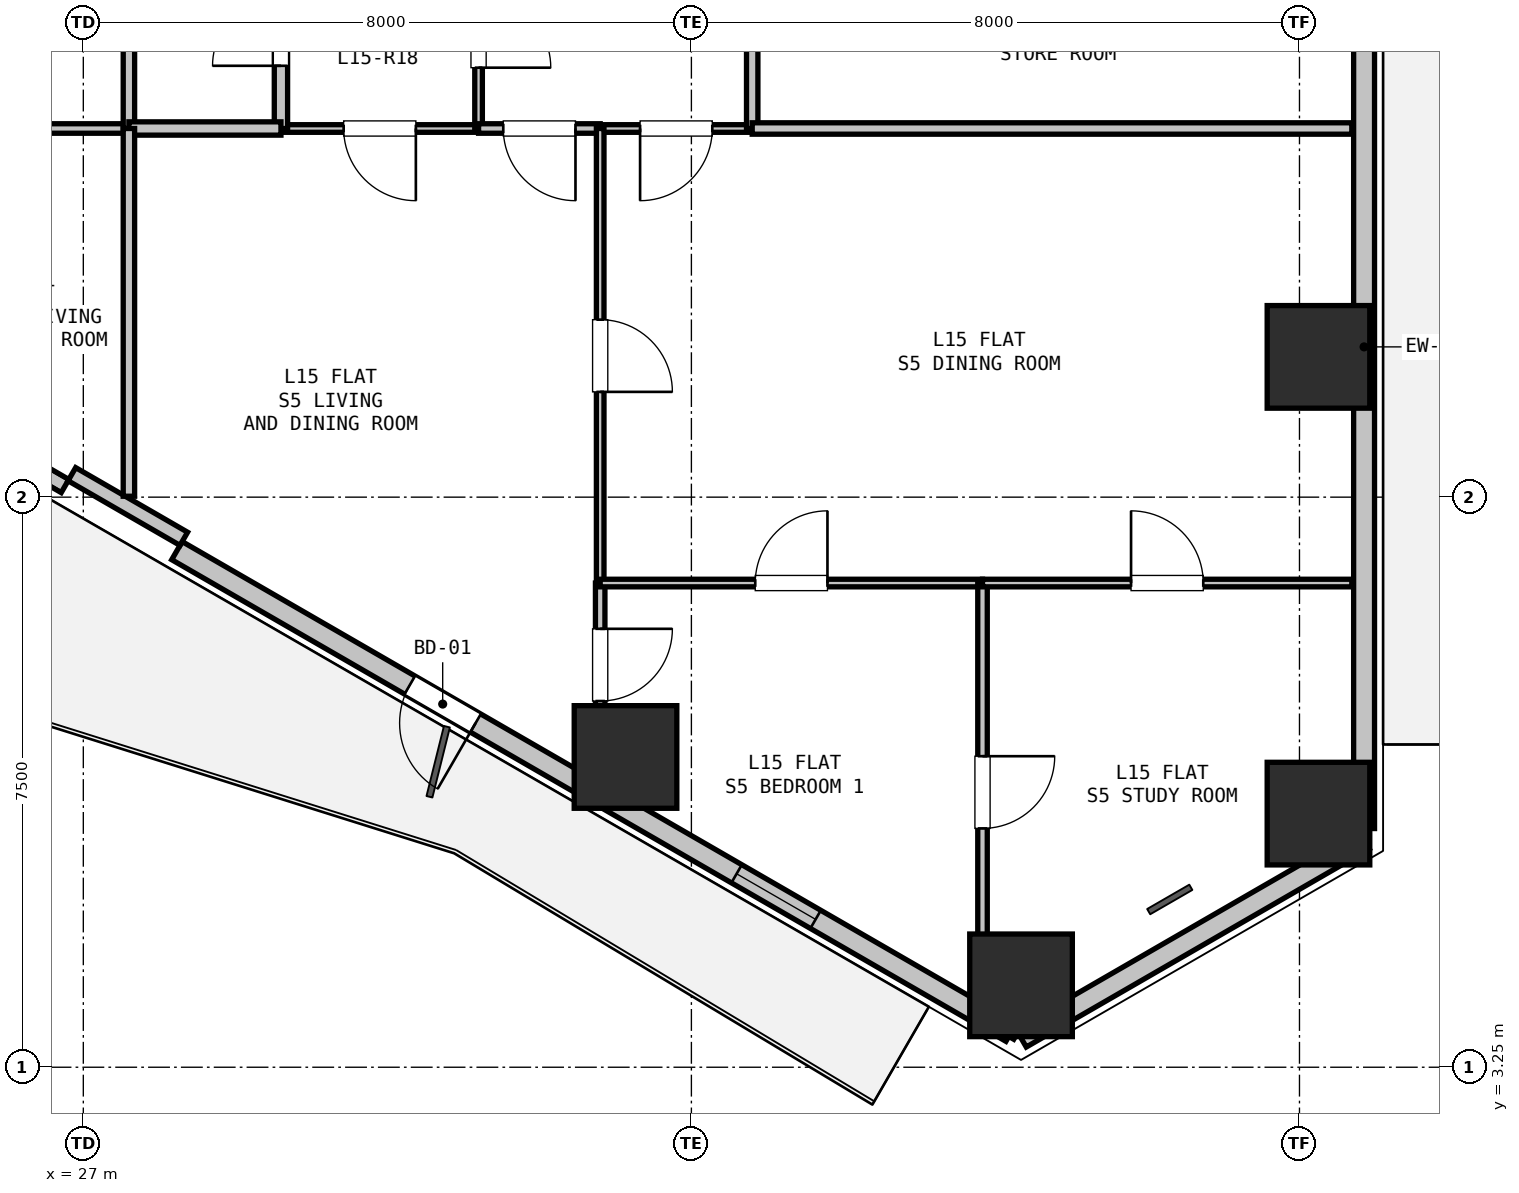
"""IFC4 building model, lengths in metres.
Left out: names, types, materials, properties, quantities, classifications, styles, units other than length and angle.
Written with IfcOpenShell. Run it as: python <this file> out.ifc"""

import sys

from ifc_helpers import new_model, si_unit, direction, frame, frame_2d, origin, origin_2d, place, context, subcontext, project, spatial, rectangle, hollow_rectangle, extrude, element, fill, save


model = new_model("IFC4")
c1 = context("Model", 3, precision=1e-05, world=origin(), true_north=direction((0.0, 1.0)))
c2 = subcontext(c1, "Body", "Model", "MODEL_VIEW")
j1 = project(units=[si_unit("LENGTHUNIT", "METRE"), si_unit("PLANEANGLEUNIT", "RADIAN")], contexts=[c1])
p1 = place(None, origin())
s1 = spatial("IfcSite", under=j1, at=p1, CompositionType="ELEMENT")
p2 = place(p1, origin())
s2 = spatial("IfcBuilding", under=s1, at=p2, CompositionType="ELEMENT")
p3 = place(p2, frame((0.0, 0.0, 55.5)))
s3 = spatial("IfcBuildingStorey", under=s2, at=p3, CompositionType="ELEMENT", Elevation=55.5)
for number, where, z_axis, x_axis in (
    (1, (43.25, 12.595, 0.0), (0.0, 0.0, 1.0), (1.0, 0.0, 0.0)),
    (2, (43.25, 6.587, 0.0), (0.0, 0.0, 1.0), (1.0, 0.0, 0.0)),
    (3, (39.337, 4.327, 0.0), (0.0, 0.0, 1.0), (1.0, 0.0, 0.0)),
    (4, (34.133, 7.332, 0.0), (0.0, 0.0, 1.0), (1.0, 0.0, 0.0)),
):
    element("IfcColumn", number, at=place(p3, frame(where, z_axis=z_axis, x_axis=x_axis)), inside=s3, PredefinedType="COLUMN", context=c2, shape_type="SweptSolid", body=[
        extrude(hollow_rectangle(XDim=1.35, YDim=1.35, WallThickness=0.036, at=origin_2d()), origin(), (0.0, 0.0, 1.0), 3.3),
    ])
p4 = place(p3, frame((43.85, 6.24, 0.0), z_axis=(0.0, 0.0, 1.0), x_axis=(-0.866043601342, -0.499968479581, 0.0)))
e5 = element("IfcWall", 5, at=p4, inside=s3, PredefinedType="SOLIDWALL", context=c2, shape_type="SweptSolid", body=[
    extrude(rectangle(XDim=5.211, YDim=0.275, at=frame_2d((2.605, 0.0))), origin(), (0.0, 0.0, 1.0), 2.66),
])
p5 = place(p3, frame((43.85, 19.063, 0.0), z_axis=(0.0, 0.0, 1.0), x_axis=(0.0, -1.0, 0.0)))
e6 = element("IfcWall", 6, at=p5, inside=s3, PredefinedType="SOLIDWALL", context=c2, shape_type="SweptSolid", body=[
    extrude(rectangle(XDim=12.673, YDim=0.275, at=frame_2d((6.336, 0.0))), origin(), (0.0, 0.0, 1.0), 2.66),
])
p6 = place(p3, frame((39.207, 3.71, 0.0), z_axis=(0.0, 0.0, 1.0), x_axis=(-0.86603192154, 0.499988710747, 0.0)))
e7 = element("IfcWall", 7, at=p6, inside=s3, PredefinedType="SOLIDWALL", context=c2, shape_type="SweptSolid", body=[
    extrude(rectangle(XDim=12.673, YDim=0.275, at=frame_2d((6.336, 0.0))), origin(), (0.0, 0.0, 1.0), 2.66),
])
p7 = place(p6, frame((8.136, 0.0, 0.0)))
e8 = element("IfcOpeningElement", 8, at=p7, cuts=e7, PredefinedType="OPENING", context=c2, shape_type="SweptSolid", body=[
    extrude(rectangle(XDim=1.0, YDim=2.1, at=frame_2d((0.5, 1.05))), frame((0.0, 0.147, 0.0), z_axis=(0.0, -1.0, 0.0), x_axis=(1.0, 0.0, 0.0)), (0.0, 0.0, 1.0), 0.295),
])
p8 = place(p6, frame((2.971, 0.0, 0.9)))
e9 = element("IfcOpeningElement", 9, at=p8, cuts=e7, PredefinedType="OPENING", context=c2, shape_type="SweptSolid", body=[
    extrude(rectangle(XDim=1.2, YDim=1.4, at=frame_2d((0.6, 0.7))), frame((0.0, 0.147, 0.0), z_axis=(0.0, -1.0, 0.0), x_axis=(1.0, 0.0, 0.0)), (0.0, 0.0, 1.0), 0.295),
])
p9 = place(p3, frame((26.76, 10.896, 0.0), z_axis=(0.0, 0.0, 1.0), x_axis=(-0.866027351828, 0.499996625875, 0.0)))
e10 = element("IfcWall", 10, at=p9, inside=s3, PredefinedType="PARAPET", context=c2, shape_type="SweptSolid", body=[
    extrude(rectangle(XDim=11.973, YDim=0.2, at=frame_2d((5.987, 0.0))), origin(), (0.0, 0.0, 1.0), 0.2),
])
p10 = place(p3, frame((28.322, 10.202, 0.0), z_axis=(0.0, 0.0, 1.0), x_axis=(-0.86605165483, 0.499954529098, 0.0)))
e11 = element("IfcWall", 11, at=p10, inside=s3, PredefinedType="PARAPET", context=c2, shape_type="SweptSolid", body=[
    extrude(rectangle(XDim=1.7, YDim=0.2, at=frame_2d((0.85, 0.0))), origin(), (0.0, 0.0, 1.0), 2.66),
])
p11 = place(p3, frame((32.2, 15.6, 0.0), z_axis=(0.0, 0.0, 1.0), x_axis=(-1.0, 0.0, 0.0)))
e12 = element("IfcWall", 12, at=p11, inside=s3, PredefinedType="PARTITIONING", context=c2, shape_type="SweptSolid", body=[
    extrude(rectangle(XDim=2.6, YDim=0.1, at=frame_2d((1.3, 0.0))), origin(), (0.0, 0.0, 1.0), 3.04),
])
p12 = place(p11, frame((0.825, 0.0, 0.0)))
e13 = element("IfcOpeningElement", 13, at=p12, cuts=e12, PredefinedType="OPENING", context=c2, shape_type="SweptSolid", body=[
    extrude(rectangle(XDim=0.95, YDim=2.1, at=frame_2d((0.475, 1.05))), frame((0.0, 0.06, 0.0), z_axis=(0.0, -1.0, 0.0), x_axis=(1.0, 0.0, 0.0)), (0.0, 0.0, 1.0), 0.12),
])
p13 = place(p3, frame((29.6, 15.6, 0.0), z_axis=(0.0, 0.0, 1.0), x_axis=(0.0, 1.0, 0.0)))
e14 = element("IfcWall", 14, at=p13, inside=s3, PredefinedType="PLUMBINGWALL", context=c2, shape_type="SweptSolid", body=[
    extrude(rectangle(XDim=2.55, YDim=0.175, at=frame_2d((1.275, 0.0))), origin(), (0.0, 0.0, 1.0), 3.04),
])
p14 = place(p13, frame((0.825, 0.0, 0.0)))
e15 = element("IfcOpeningElement", 15, at=p14, cuts=e14, PredefinedType="OPENING", context=c2, shape_type="SweptSolid", body=[
    extrude(rectangle(XDim=0.9, YDim=2.1, at=frame_2d((0.45, 1.05))), frame((0.0, 0.097, 0.0), z_axis=(0.0, -1.0, 0.0), x_axis=(1.0, 0.0, 0.0)), (0.0, 0.0, 1.0), 0.195),
])
p15 = place(p3, frame((32.2, 18.15, 0.0), z_axis=(0.0, 0.0, 1.0), x_axis=(0.0, -1.0, 0.0)))
e16 = element("IfcWall", 16, at=p15, inside=s3, PredefinedType="PARTITIONING", context=c2, shape_type="SweptSolid", body=[
    extrude(rectangle(XDim=2.55, YDim=0.1, at=frame_2d((1.275, 0.0))), origin(), (0.0, 0.0, 1.0), 3.04),
])
p16 = place(p15, frame((0.8, 0.0, 0.0)))
e17 = element("IfcOpeningElement", 17, at=p16, cuts=e16, PredefinedType="OPENING", context=c2, shape_type="SweptSolid", body=[
    extrude(rectangle(XDim=0.95, YDim=2.1, at=frame_2d((0.475, 1.05))), frame((0.0, 0.06, 0.0), z_axis=(0.0, -1.0, 0.0), x_axis=(1.0, 0.0, 0.0)), (0.0, 0.0, 1.0), 0.12),
])
p17 = place(p3, frame((27.6, 15.6, 0.0), z_axis=(0.0, 0.0, 1.0), x_axis=(-1.0, 0.0, 0.0)))
e18 = element("IfcWall", 18, at=p17, inside=s3, PredefinedType="PARTITIONING", context=c2, shape_type="SweptSolid", body=[
    extrude(rectangle(XDim=3.2, YDim=0.125, at=frame_2d((1.6, 0.0))), origin(), (0.0, 0.0, 1.0), 2.337),
])
p18 = place(p17, frame((1.125, 0.0, 0.0)))
e19 = element("IfcOpeningElement", 19, at=p18, cuts=e18, PredefinedType="OPENING", context=c2, shape_type="SweptSolid", body=[
    extrude(rectangle(XDim=0.95, YDim=2.1, at=frame_2d((0.475, 1.05))), frame((0.0, 0.073, 0.0), z_axis=(0.0, -1.0, 0.0), x_axis=(1.0, 0.0, 0.0)), (0.0, 0.0, 1.0), 0.145),
])
p19 = place(p3, frame((27.6, 18.15, 0.0), z_axis=(0.0, 0.0, 1.0), x_axis=(0.0, -1.0, 0.0)))
e20 = element("IfcWall", 20, at=p19, inside=s3, PredefinedType="PARTITIONING", context=c2, shape_type="SweptSolid", body=[
    extrude(rectangle(XDim=2.55, YDim=0.15, at=frame_2d((1.275, 0.0))), origin(), (0.0, 0.0, 1.0), 3.04),
])
p20 = place(p3, frame((29.6, 15.6, 0.0), z_axis=(0.0, 0.0, 1.0), x_axis=(-1.0, 0.0, 0.0)))
e21 = element("IfcWall", 21, at=p20, inside=s3, PredefinedType="PLUMBINGWALL", context=c2, shape_type="SweptSolid", body=[
    extrude(rectangle(XDim=2.0, YDim=0.175, at=frame_2d((1.0, 0.0))), origin(), (0.0, 0.0, 1.0), 3.04),
])
p21 = place(p3, frame((35.8, 15.6, 0.0), z_axis=(0.0, 0.0, 1.0), x_axis=(-1.0, 0.0, 0.0)))
e22 = element("IfcWall", 22, at=p21, inside=s3, PredefinedType="PARTITIONING", context=c2, shape_type="SweptSolid", body=[
    extrude(rectangle(XDim=2.0, YDim=0.1, at=frame_2d((1.0, 0.0))), origin(), (0.0, 0.0, 1.0), 3.04),
])
p22 = place(p21, frame((0.525, 0.0, 0.0)))
e23 = element("IfcOpeningElement", 23, at=p22, cuts=e22, PredefinedType="OPENING", context=c2, shape_type="SweptSolid", body=[
    extrude(rectangle(XDim=0.95, YDim=2.1, at=frame_2d((0.475, 1.05))), frame((0.0, 0.06, 0.0), z_axis=(0.0, -1.0, 0.0), x_axis=(1.0, 0.0, 0.0)), (0.0, 0.0, 1.0), 0.12),
])
p23 = place(p3, frame((33.8, 15.6, 0.0), z_axis=(0.0, 0.0, 1.0), x_axis=(-1.0, 0.0, 0.0)))
e24 = element("IfcWall", 24, at=p23, inside=s3, PredefinedType="PARTITIONING", context=c2, shape_type="SweptSolid", body=[
    extrude(rectangle(XDim=1.6, YDim=0.125, at=frame_2d((0.8, 0.0))), origin(), (0.0, 0.0, 1.0), 3.04),
])
p24 = place(p23, frame((0.325, 0.0, 0.0)))
e25 = element("IfcOpeningElement", 25, at=p24, cuts=e24, PredefinedType="OPENING", context=c2, shape_type="SweptSolid", body=[
    extrude(rectangle(XDim=0.95, YDim=2.1, at=frame_2d((0.475, 1.05))), frame((0.0, 0.073, 0.0), z_axis=(0.0, -1.0, 0.0), x_axis=(1.0, 0.0, 0.0)), (0.0, 0.0, 1.0), 0.145),
])
p25 = place(p3, frame((35.8, 18.15, 0.0), z_axis=(0.0, 0.0, 1.0), x_axis=(0.0, -1.0, 0.0)))
e26 = element("IfcWall", 26, at=p25, inside=s3, PredefinedType="PARTITIONING", context=c2, shape_type="SweptSolid", body=[
    extrude(rectangle(XDim=2.55, YDim=0.15, at=frame_2d((1.275, 0.0))), origin(), (0.0, 0.0, 1.0), 3.04),
])
p26 = place(p3, frame((43.688, 15.6, 0.0), z_axis=(0.0, 0.0, 1.0), x_axis=(-1.0, 0.0, 0.0)))
e27 = element("IfcWall", 27, at=p26, inside=s3, PredefinedType="PARTITIONING", context=c2, shape_type="SweptSolid", body=[
    extrude(rectangle(XDim=7.888, YDim=0.15, at=frame_2d((3.944, 0.0))), origin(), (0.0, 0.0, 1.0), 2.337),
])
p27 = place(p3, frame((27.6, 15.6, 0.0), z_axis=(0.0, 0.0, 1.0), x_axis=(0.0, -1.0, 0.0)))
e28 = element("IfcWall", 28, at=p27, inside=s3, PredefinedType="PARTITIONING", context=c2, shape_type="SweptSolid", body=[
    extrude(rectangle(XDim=4.838, YDim=0.15, at=frame_2d((2.419, 0.0))), origin(), (0.0, 0.0, 1.0), 2.337),
])
p28 = place(p3, frame((33.8, 15.6, 0.0), z_axis=(0.0, 0.0, 1.0), x_axis=(0.0, -1.0, 0.0)))
e29 = element("IfcWall", 29, at=p28, inside=s3, PredefinedType="PARTITIONING", context=c2, shape_type="SweptSolid", body=[
    extrude(rectangle(XDim=5.98, YDim=0.1, at=frame_2d((2.99, 0.0))), origin(), (0.0, 0.0, 1.0), 3.04),
])
p29 = place(p28, frame((2.515, 0.0, 0.0)))
e30 = element("IfcOpeningElement", 30, at=p29, cuts=e29, PredefinedType="OPENING", context=c2, shape_type="SweptSolid", body=[
    extrude(rectangle(XDim=0.95, YDim=2.1, at=frame_2d((0.475, 1.05))), frame((0.0, 0.06, 0.0), z_axis=(0.0, -1.0, 0.0), x_axis=(1.0, 0.0, 0.0)), (0.0, 0.0, 1.0), 0.12),
])
p30 = place(p3, frame((33.8, 9.62, 0.0), z_axis=(0.0, 0.0, 1.0), x_axis=(0.0, -1.0, 0.0)))
e31 = element("IfcWall", 31, at=p30, inside=s3, PredefinedType="PARTITIONING", context=c2, shape_type="SweptSolid", body=[
    extrude(rectangle(XDim=2.602, YDim=0.125, at=frame_2d((1.301, 0.0))), origin(), (0.0, 0.0, 1.0), 2.337),
])
p31 = place(p30, frame((0.602, 0.0, 0.0)))
e32 = element("IfcOpeningElement", 32, at=p31, cuts=e31, PredefinedType="OPENING", context=c2, shape_type="SweptSolid", body=[
    extrude(rectangle(XDim=0.95, YDim=2.1, at=frame_2d((0.475, 1.05))), frame((0.0, 0.073, 0.0), z_axis=(0.0, -1.0, 0.0), x_axis=(1.0, 0.0, 0.0)), (0.0, 0.0, 1.0), 0.145),
])
p32 = place(p3, frame((33.8, 9.62, 0.0), z_axis=(0.0, 0.0, 1.0), x_axis=(1.0, 0.0, 0.0)))
e33 = element("IfcWall", 33, at=p32, inside=s3, PredefinedType="PARTITIONING", context=c2, shape_type="SweptSolid", body=[
    extrude(rectangle(XDim=5.03, YDim=0.1, at=frame_2d((2.515, 0.0))), origin(), (0.0, 0.0, 1.0), 3.04),
])
p33 = place(p32, frame((2.04, 0.0, 0.0)))
e34 = element("IfcOpeningElement", 34, at=p33, cuts=e33, PredefinedType="OPENING", context=c2, shape_type="SweptSolid", body=[
    extrude(rectangle(XDim=0.95, YDim=2.1, at=frame_2d((0.475, 1.05))), frame((0.0, 0.06, 0.0), z_axis=(0.0, -1.0, 0.0), x_axis=(1.0, 0.0, 0.0)), (0.0, 0.0, 1.0), 0.12),
])
p34 = place(p3, frame((38.83, 9.62, 0.0), z_axis=(0.0, 0.0, 1.0), x_axis=(0.0, -1.0, 0.0)))
e35 = element("IfcWall", 35, at=p34, inside=s3, PredefinedType="PARTITIONING", context=c2, shape_type="SweptSolid", body=[
    extrude(rectangle(XDim=5.506, YDim=0.125, at=frame_2d((2.753, 0.0))), origin(), (0.0, 0.0, 1.0), 2.65),
])
p35 = place(p34, frame((2.278, 0.0, 0.0)))
e36 = element("IfcOpeningElement", 36, at=p35, cuts=e35, PredefinedType="OPENING", context=c2, shape_type="SweptSolid", body=[
    extrude(rectangle(XDim=0.95, YDim=2.1, at=frame_2d((0.475, 1.05))), frame((0.0, 0.073, 0.0), z_axis=(0.0, -1.0, 0.0), x_axis=(1.0, 0.0, 0.0)), (0.0, 0.0, 1.0), 0.145),
])
p36 = place(p3, frame((38.83, 9.62, 0.0), z_axis=(0.0, 0.0, 1.0), x_axis=(1.0, 0.0, 0.0)))
e37 = element("IfcWall", 37, at=p36, inside=s3, PredefinedType="PARTITIONING", context=c2, shape_type="SweptSolid", body=[
    extrude(rectangle(XDim=4.858, YDim=0.1, at=frame_2d((2.429, 0.0))), origin(), (0.0, 0.0, 1.0), 2.337),
])
p37 = place(p36, frame((1.954, 0.0, 0.0)))
e38 = element("IfcOpeningElement", 38, at=p37, cuts=e37, PredefinedType="OPENING", context=c2, shape_type="SweptSolid", body=[
    extrude(rectangle(XDim=0.95, YDim=2.1, at=frame_2d((0.475, 1.05))), frame((0.0, 0.06, 0.0), z_axis=(0.0, -1.0, 0.0), x_axis=(1.0, 0.0, 0.0)), (0.0, 0.0, 1.0), 0.12),
])
p38 = place(p3, frame((39.272, 3.672, 0.0), z_axis=(0.0, 0.0, 1.0), x_axis=(-0.866442544969, 0.49927679324, 0.0)))
e39 = element("IfcWall", 39, at=p38, inside=s3, PredefinedType="PARTITIONING", context=c2, shape_type="SweptSolid", body=[
    extrude(rectangle(XDim=0.142, YDim=0.125, at=frame_2d((0.071, 0.0))), origin(), (0.0, 0.0, 1.0), 3.04),
])
p39 = place(p7, origin())
e40 = element("IfcDoor", 40, at=p39, inside=s3, OperationType="SINGLE_SWING_LEFT", PredefinedType="DOOR", context=c2, shape_type="SweptSolid", body=[
    extrude(rectangle(XDim=1.0, YDim=2.1, at=frame_2d((0.5, 1.05))), frame((0.0, 0.025, 0.0), z_axis=(0.0, -1.0, 0.0), x_axis=(1.0, 0.0, 0.0)), (0.0, 0.0, 1.0), 0.05),
])
fill(e8, e40)
p40 = place(p8, origin())
e41 = element("IfcWindow", 41, at=p40, inside=s3, PartitioningType="SINGLE_PANEL", PredefinedType="WINDOW", context=c2, shape_type="SweptSolid", body=[
    extrude(rectangle(XDim=1.2, YDim=1.4, at=frame_2d((0.6, 0.7))), frame((0.0, 0.03, 0.0), z_axis=(0.0, -1.0, 0.0), x_axis=(1.0, 0.0, 0.0)), (0.0, 0.0, 1.0), 0.06),
])
fill(e9, e41)
p41 = place(p14, origin())
e42 = element("IfcDoor", 42, at=p41, inside=s3, OperationType="SINGLE_SWING_LEFT", PredefinedType="DOOR", context=c2, shape_type="SweptSolid", body=[
    extrude(rectangle(XDim=0.9, YDim=2.1, at=frame_2d((0.45, 1.05))), frame((0.0, 0.025, 0.0), z_axis=(0.0, -1.0, 0.0), x_axis=(1.0, 0.0, 0.0)), (0.0, 0.0, 1.0), 0.05),
])
fill(e15, e42)
p42 = place(p16, origin())
e43 = element("IfcDoor", 43, at=p42, inside=s3, OperationType="SINGLE_SWING_RIGHT", PredefinedType="DOOR", context=c2, shape_type="SweptSolid", body=[
    extrude(rectangle(XDim=0.95, YDim=2.1, at=frame_2d((0.475, 1.05))), frame((0.0, 0.025, 0.0), z_axis=(0.0, -1.0, 0.0), x_axis=(1.0, 0.0, 0.0)), (0.0, 0.0, 1.0), 0.05),
])
fill(e17, e43)
p43 = place(p12, origin())
e44 = element("IfcDoor", 44, at=p43, inside=s3, OperationType="SINGLE_SWING_LEFT", PredefinedType="DOOR", context=c2, shape_type="SweptSolid", body=[
    extrude(rectangle(XDim=0.95, YDim=2.1, at=frame_2d((0.475, 1.05))), frame((0.0, 0.025, 0.0), z_axis=(0.0, -1.0, 0.0), x_axis=(1.0, 0.0, 0.0)), (0.0, 0.0, 1.0), 0.05),
])
fill(e13, e44)
p44 = place(p24, origin())
e45 = element("IfcDoor", 45, at=p44, inside=s3, OperationType="SINGLE_SWING_LEFT", PredefinedType="DOOR", context=c2, shape_type="SweptSolid", body=[
    extrude(rectangle(XDim=0.95, YDim=2.1, at=frame_2d((0.475, 1.05))), frame((0.0, 0.025, 0.0), z_axis=(0.0, -1.0, 0.0), x_axis=(1.0, 0.0, 0.0)), (0.0, 0.0, 1.0), 0.05),
])
fill(e25, e45)
p45 = place(p22, origin())
e46 = element("IfcDoor", 46, at=p45, inside=s3, OperationType="SINGLE_SWING_RIGHT", PredefinedType="DOOR", context=c2, shape_type="SweptSolid", body=[
    extrude(rectangle(XDim=0.95, YDim=2.1, at=frame_2d((0.475, 1.05))), frame((0.0, 0.025, 0.0), z_axis=(0.0, -1.0, 0.0), x_axis=(1.0, 0.0, 0.0)), (0.0, 0.0, 1.0), 0.05),
])
fill(e23, e46)
p46 = place(p31, origin())
e47 = element("IfcDoor", 47, at=p46, inside=s3, OperationType="SINGLE_SWING_LEFT", PredefinedType="DOOR", context=c2, shape_type="SweptSolid", body=[
    extrude(rectangle(XDim=0.95, YDim=2.1, at=frame_2d((0.475, 1.05))), frame((0.0, 0.025, 0.0), z_axis=(0.0, -1.0, 0.0), x_axis=(1.0, 0.0, 0.0)), (0.0, 0.0, 1.0), 0.05),
])
fill(e32, e47)
p47 = place(p29, origin())
e48 = element("IfcDoor", 48, at=p47, inside=s3, OperationType="SINGLE_SWING_RIGHT", PredefinedType="DOOR", context=c2, shape_type="SweptSolid", body=[
    extrude(rectangle(XDim=0.95, YDim=2.1, at=frame_2d((0.475, 1.05))), frame((0.0, 0.025, 0.0), z_axis=(0.0, -1.0, 0.0), x_axis=(1.0, 0.0, 0.0)), (0.0, 0.0, 1.0), 0.05),
])
fill(e30, e48)
p48 = place(p35, origin())
e49 = element("IfcDoor", 49, at=p48, inside=s3, OperationType="SINGLE_SWING_LEFT", PredefinedType="DOOR", context=c2, shape_type="SweptSolid", body=[
    extrude(rectangle(XDim=0.95, YDim=2.1, at=frame_2d((0.475, 1.05))), frame((0.0, 0.025, 0.0), z_axis=(0.0, -1.0, 0.0), x_axis=(1.0, 0.0, 0.0)), (0.0, 0.0, 1.0), 0.05),
])
fill(e36, e49)
p49 = place(p33, origin())
e50 = element("IfcDoor", 50, at=p49, inside=s3, OperationType="SINGLE_SWING_RIGHT", PredefinedType="DOOR", context=c2, shape_type="SweptSolid", body=[
    extrude(rectangle(XDim=0.95, YDim=2.1, at=frame_2d((0.475, 1.05))), frame((0.0, 0.025, 0.0), z_axis=(0.0, -1.0, 0.0), x_axis=(1.0, 0.0, 0.0)), (0.0, 0.0, 1.0), 0.05),
])
fill(e34, e50)
p50 = place(p37, origin())
e51 = element("IfcDoor", 51, at=p50, inside=s3, OperationType="SINGLE_SWING_LEFT", PredefinedType="DOOR", context=c2, shape_type="SweptSolid", body=[
    extrude(rectangle(XDim=0.95, YDim=2.1, at=frame_2d((0.475, 1.05))), frame((0.0, 0.025, 0.0), z_axis=(0.0, -1.0, 0.0), x_axis=(1.0, 0.0, 0.0)), (0.0, 0.0, 1.0), 0.05),
])
fill(e38, e51)
save(model, sys.argv[1])
